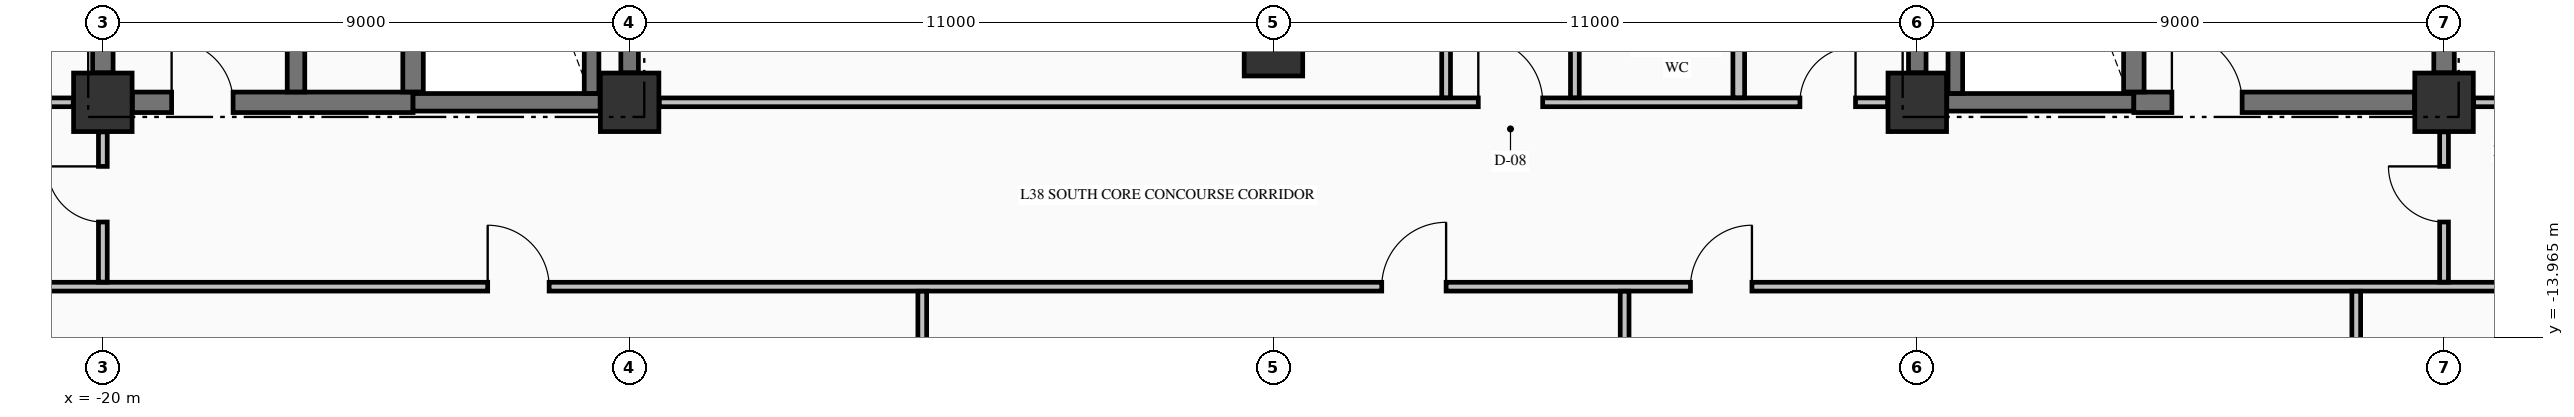
"""IFC4 building model, lengths in metres.
Left out: names, types, materials, properties, quantities, classifications, styles, units other than length and angle.
Written with IfcOpenShell. Run it as: python <this file> out.ifc"""

import sys

from ifc_helpers import new_model, si_unit, direction, frame, frame_2d, origin, origin_2d, place, context, subcontext, project, spatial, rectangle, extrude, element, fill, save


model = new_model("IFC4")
c1 = context("Model", 3, precision=1e-05, world=origin(), true_north=direction((0.0, 1.0)))
c2 = subcontext(c1, "Body", "Model", "MODEL_VIEW")
j1 = project(units=[si_unit("LENGTHUNIT", "METRE"), si_unit("PLANEANGLEUNIT", "RADIAN")], contexts=[c1])
p1 = place(None, origin())
s1 = spatial("IfcSite", under=j1, at=p1, CompositionType="ELEMENT")
p2 = place(p1, origin())
s2 = spatial("IfcBuilding", under=s1, at=p2, CompositionType="ELEMENT")
p3 = place(p2, frame((0.0, 0.0, 149.91)))
s3 = spatial("IfcBuildingStorey", under=s2, at=p3, CompositionType="ELEMENT", Elevation=149.91)
for number, where, z_axis, x_axis in (
    (1, (-20.0, -9.95, -0.25), (0.0, 0.0, 1.0), (1.0, 0.0, 0.0)),
    (2, (-11.0, -9.95, -0.25), (0.0, 0.0, 1.0), (1.0, 0.0, 0.0)),
    (3, (11.0, -9.95, -0.25), (0.0, 0.0, 1.0), (1.0, 0.0, 0.0)),
    (4, (20.0, -9.95, -0.25), (0.0, 0.0, 1.0), (1.0, 0.0, 0.0)),
    (5, (0.0, -9.0, -0.25), (0.0, 0.0, 1.0), (1.0, 0.0, 0.0)),
):
    element("IfcColumn", number, at=place(p3, frame(where, z_axis=z_axis, x_axis=x_axis)), inside=s3, PredefinedType="COLUMN", context=c2, shape_type="SweptSolid", body=[
        extrude(rectangle(XDim=1.0, YDim=1.0, at=origin_2d()), origin(), (0.0, 0.0, 1.0), 3.395),
    ])
p4 = place(p3, frame((-19.496, -9.95, 0.0), z_axis=(0.0, 0.0, 1.0), x_axis=(1.0, 0.0, 0.0)))
e6 = element("IfcWall", 6, at=p4, inside=s3, PredefinedType="SHEAR", context=c2, shape_type="SweptSolid", body=[
    extrude(rectangle(XDim=4.796, YDim=0.35, at=frame_2d((2.398, 0.0))), origin(), (0.0, 0.0, 1.0), 3.145),
])
p5 = place(p4, frame((0.671, 0.0, 0.0)))
e7 = element("IfcOpeningElement", 7, at=p5, cuts=e6, PredefinedType="OPENING", context=c2, shape_type="SweptSolid", body=[
    extrude(rectangle(XDim=1.05, YDim=2.15, at=frame_2d((0.525, 1.075))), frame((0.0, 0.185, 0.0), z_axis=(0.0, -1.0, 0.0), x_axis=(1.0, 0.0, 0.0)), (0.0, 0.0, 1.0), 0.37),
])
for number, where, z_axis, x_axis in (
    (8, (-14.7, -9.95, 0.0), (0.0, 0.0, 1.0), (1.0, 0.0, 0.0)),
    (9, (11.504, -9.95, 0.0), (0.0, 0.0, 1.0), (1.0, 0.0, 0.0)),
):
    element("IfcWall", number, at=place(p3, frame(where, z_axis=z_axis, x_axis=x_axis)), inside=s3, PredefinedType="SHEAR", context=c2, shape_type="SweptSolid", body=[
        extrude(rectangle(XDim=3.196, YDim=0.3, at=frame_2d((1.598, 0.0))), origin(), (0.0, 0.0, 1.0), 3.145),
    ])
p6 = place(p3, frame((14.7, -9.95, 0.0), z_axis=(0.0, 0.0, 1.0), x_axis=(1.0, 0.0, 0.0)))
e10 = element("IfcWall", 10, at=p6, inside=s3, PredefinedType="SHEAR", context=c2, shape_type="SweptSolid", body=[
    extrude(rectangle(XDim=4.796, YDim=0.35, at=frame_2d((2.398, 0.0))), origin(), (0.0, 0.0, 1.0), 3.145),
])
p7 = place(p6, frame((0.65, 0.0, 0.0)))
e11 = element("IfcOpeningElement", 11, at=p7, cuts=e10, PredefinedType="OPENING", context=c2, shape_type="SweptSolid", body=[
    extrude(rectangle(XDim=1.2, YDim=2.15, at=frame_2d((0.6, 1.075))), frame((0.0, 0.185, 0.0), z_axis=(0.0, -1.0, 0.0), x_axis=(1.0, 0.0, 0.0)), (0.0, 0.0, 1.0), 0.37),
])
p8 = place(p3, frame((-27.835, -13.1, 0.0), z_axis=(0.0, 0.0, 1.0), x_axis=(1.0, 0.0, 0.0)))
e12 = element("IfcWall", 12, at=p8, inside=s3, PredefinedType="PARTITIONING", context=c2, shape_type="SweptSolid", body=[
    extrude(rectangle(XDim=50.67, YDim=0.15, at=frame_2d((25.335, 0.0))), origin(), (0.0, 0.0, 1.0), 3.145),
])
p9 = place(p8, frame((29.685, 0.0, 0.0)))
e13 = element("IfcOpeningElement", 13, at=p9, cuts=e12, PredefinedType="OPENING", context=c2, shape_type="SweptSolid", body=[
    extrude(rectangle(XDim=1.1, YDim=2.15, at=frame_2d((0.55, 1.075))), frame((0.0, 0.085, 0.0), z_axis=(0.0, -1.0, 0.0), x_axis=(1.0, 0.0, 0.0)), (0.0, 0.0, 1.0), 0.17),
])
p10 = place(p8, frame((14.41, 0.0, 0.0)))
e14 = element("IfcOpeningElement", 14, at=p10, cuts=e12, PredefinedType="OPENING", context=c2, shape_type="SweptSolid", body=[
    extrude(rectangle(XDim=1.05, YDim=2.15, at=frame_2d((0.525, 1.075))), frame((0.0, 0.085, 0.0), z_axis=(0.0, -1.0, 0.0), x_axis=(1.0, 0.0, 0.0)), (0.0, 0.0, 1.0), 0.17),
])
p11 = place(p8, frame((34.96, 0.0, 0.0)))
e15 = element("IfcOpeningElement", 15, at=p11, cuts=e12, PredefinedType="OPENING", context=c2, shape_type="SweptSolid", body=[
    extrude(rectangle(XDim=1.05, YDim=2.15, at=frame_2d((0.525, 1.075))), frame((0.0, 0.085, 0.0), z_axis=(0.0, -1.0, 0.0), x_axis=(1.0, 0.0, 0.0)), (0.0, 0.0, 1.0), 0.17),
])
p12 = place(p3, frame((-27.835, -9.95, 0.0), z_axis=(0.0, 0.0, 1.0), x_axis=(1.0, 0.0, 0.0)))
e16 = element("IfcWall", 16, at=p12, inside=s3, PredefinedType="PARTITIONING", context=c2, shape_type="SweptSolid", body=[
    extrude(rectangle(XDim=7.329, YDim=0.15, at=frame_2d((3.665, 0.0))), origin(), (0.0, 0.0, 1.0), 3.145),
])
p13 = place(p12, frame((3.36, 0.0, 0.0)))
e17 = element("IfcOpeningElement", 17, at=p13, cuts=e16, PredefinedType="OPENING", context=c2, shape_type="SweptSolid", body=[
    extrude(rectangle(XDim=0.95, YDim=2.15, at=frame_2d((0.475, 1.075))), frame((0.0, 0.085, 0.0), z_axis=(0.0, -1.0, 0.0), x_axis=(1.0, 0.0, 0.0)), (0.0, 0.0, 1.0), 0.17),
])
p14 = place(p3, frame((-10.494, -9.95, 0.0), z_axis=(0.0, 0.0, 1.0), x_axis=(1.0, 0.0, 0.0)))
e18 = element("IfcWall", 18, at=p14, inside=s3, PredefinedType="PARTITIONING", context=c2, shape_type="SweptSolid", body=[
    extrude(rectangle(XDim=20.988, YDim=0.15, at=frame_2d((10.494, 0.0))), origin(), (0.0, 0.0, 1.0), 3.145),
])
p15 = place(p14, frame((13.994, 0.0, 0.0)))
e19 = element("IfcOpeningElement", 19, at=p15, cuts=e18, PredefinedType="OPENING", context=c2, shape_type="SweptSolid", body=[
    extrude(rectangle(XDim=1.1, YDim=2.15, at=frame_2d((0.55, 1.075))), frame((0.0, 0.085, 0.0), z_axis=(0.0, -1.0, 0.0), x_axis=(1.0, 0.0, 0.0)), (0.0, 0.0, 1.0), 0.17),
])
p16 = place(p14, frame((19.489, 0.0, 0.0)))
e20 = element("IfcOpeningElement", 20, at=p16, cuts=e18, PredefinedType="OPENING", context=c2, shape_type="SweptSolid", body=[
    extrude(rectangle(XDim=0.95, YDim=2.15, at=frame_2d((0.475, 1.075))), frame((0.0, 0.085, 0.0), z_axis=(0.0, -1.0, 0.0), x_axis=(1.0, 0.0, 0.0)), (0.0, 0.0, 1.0), 0.17),
])
p17 = place(p3, frame((20.506, -9.95, 0.0), z_axis=(0.0, 0.0, 1.0), x_axis=(1.0, 0.0, 0.0)))
e21 = element("IfcWall", 21, at=p17, inside=s3, PredefinedType="PARTITIONING", context=c2, shape_type="SweptSolid", body=[
    extrude(rectangle(XDim=2.329, YDim=0.15, at=frame_2d((1.165, 0.0))), origin(), (0.0, 0.0, 1.0), 3.145),
])
p18 = place(p17, frame((0.494, 0.0, 0.0)))
e22 = element("IfcOpeningElement", 22, at=p18, cuts=e21, PredefinedType="OPENING", context=c2, shape_type="SweptSolid", body=[
    extrude(rectangle(XDim=1.0, YDim=2.15, at=frame_2d((0.5, 1.075))), frame((0.0, 0.085, 0.0), z_axis=(0.0, -1.0, 0.0), x_axis=(1.0, 0.0, 0.0)), (0.0, 0.0, 1.0), 0.17),
])
p19 = place(p3, frame((-20.0, -9.446, 0.0), z_axis=(0.0, 0.0, 1.0), x_axis=(0.0, 1.0, 0.0)))
e23 = element("IfcWall", 23, at=p19, inside=s3, PredefinedType="SHEAR", context=c2, shape_type="SweptSolid", body=[
    extrude(rectangle(XDim=8.942, YDim=0.35, at=frame_2d((4.471, 0.0))), origin(), (0.0, 0.0, 1.0), 3.145),
])
p20 = place(p3, frame((-16.7, -9.773, 0.0), z_axis=(0.0, 0.0, 1.0), x_axis=(0.0, 1.0, 0.0)))
e24 = element("IfcWall", 24, at=p20, inside=s3, PredefinedType="SHEAR", context=c2, shape_type="SweptSolid", body=[
    extrude(rectangle(XDim=9.371, YDim=0.3, at=frame_2d((4.686, 0.0))), origin(), (0.0, 0.0, 1.0), 3.145),
])
p21 = place(p3, frame((-14.7, -9.773, 0.0), z_axis=(0.0, 0.0, 1.0), x_axis=(0.0, 1.0, 0.0)))
e25 = element("IfcWall", 25, at=p21, inside=s3, PredefinedType="SHEAR", context=c2, shape_type="SweptSolid", body=[
    extrude(rectangle(XDim=9.371, YDim=0.35, at=frame_2d((4.686, 0.0))), origin(), (0.0, 0.0, 1.0), 3.145),
])
p22 = place(p3, frame((-11.65, -9.798, 0.0), z_axis=(0.0, 0.0, 1.0), x_axis=(0.0, 1.0, 0.0)))
e26 = element("IfcWall", 26, at=p22, inside=s3, PredefinedType="SOLIDWALL", context=c2, shape_type="SweptSolid", body=[
    extrude(rectangle(XDim=9.396, YDim=0.25, at=frame_2d((4.698, 0.0))), origin(), (0.0, 0.0, 1.0), 3.145),
])
for number, where, z_axis, x_axis in (
    (27, (-11.0, -9.446, 0.0), (0.0, 0.0, 1.0), (0.0, 1.0, 0.0)),
    (28, (11.0, -9.446, 0.0), (0.0, 0.0, 1.0), (0.0, 1.0, 0.0)),
):
    element("IfcWall", number, at=place(p3, frame(where, z_axis=z_axis, x_axis=x_axis)), inside=s3, PredefinedType="SHEAR", context=c2, shape_type="SweptSolid", body=[
        extrude(rectangle(XDim=8.942, YDim=0.3, at=frame_2d((4.471, 0.0))), origin(), (0.0, 0.0, 1.0), 3.145),
    ])
p23 = place(p3, frame((11.65, -9.798, 0.0), z_axis=(0.0, 0.0, 1.0), x_axis=(0.0, 1.0, 0.0)))
e29 = element("IfcWall", 29, at=p23, inside=s3, PredefinedType="SOLIDWALL", context=c2, shape_type="SweptSolid", body=[
    extrude(rectangle(XDim=9.396, YDim=0.25, at=frame_2d((4.698, 0.0))), origin(), (0.0, 0.0, 1.0), 3.145),
])
p24 = place(p3, frame((14.7, -9.773, 0.0), z_axis=(0.0, 0.0, 1.0), x_axis=(0.0, 1.0, 0.0)))
e30 = element("IfcWall", 30, at=p24, inside=s3, PredefinedType="SHEAR", context=c2, shape_type="SweptSolid", body=[
    extrude(rectangle(XDim=9.371, YDim=0.35, at=frame_2d((4.686, 0.0))), origin(), (0.0, 0.0, 1.0), 3.145),
])
p25 = place(p3, frame((20.0, -9.446, 0.0), z_axis=(0.0, 0.0, 1.0), x_axis=(0.0, 1.0, 0.0)))
e31 = element("IfcWall", 31, at=p25, inside=s3, PredefinedType="SHEAR", context=c2, shape_type="SweptSolid", body=[
    extrude(rectangle(XDim=2.269, YDim=0.35, at=frame_2d((1.135, 0.0))), origin(), (0.0, 0.0, 1.0), 3.145),
])
p26 = place(p3, frame((-20.0, -13.022, 0.0), z_axis=(0.0, 0.0, 1.0), x_axis=(0.0, 1.0, 0.0)))
e32 = element("IfcWall", 32, at=p26, inside=s3, PredefinedType="PARTITIONING", context=c2, shape_type="SweptSolid", body=[
    extrude(rectangle(XDim=2.566, YDim=0.15, at=frame_2d((1.283, 0.0))), origin(), (0.0, 0.0, 1.0), 2.635),
])
p27 = place(p26, frame((1.027, 0.0, 0.0)))
e33 = element("IfcOpeningElement", 33, at=p27, cuts=e32, PredefinedType="OPENING", context=c2, shape_type="SweptSolid", body=[
    extrude(rectangle(XDim=0.95, YDim=2.15, at=frame_2d((0.475, 1.075))), frame((0.0, 0.085, 0.0), z_axis=(0.0, -1.0, 0.0), x_axis=(1.0, 0.0, 0.0)), (0.0, 0.0, 1.0), 0.17),
])
p28 = place(p3, frame((-6.0, -17.472, 0.0), z_axis=(0.0, 0.0, 1.0), x_axis=(0.0, 1.0, 0.0)))
e34 = element("IfcWall", 34, at=p28, inside=s3, PredefinedType="PARTITIONING", context=c2, shape_type="SweptSolid", body=[
    extrude(rectangle(XDim=4.294, YDim=0.15, at=frame_2d((2.147, 0.0))), origin(), (0.0, 0.0, 1.0), 3.145),
])
p29 = place(p3, frame((2.95, -9.872, 0.0), z_axis=(0.0, 0.0, 1.0), x_axis=(0.0, 1.0, 0.0)))
e35 = element("IfcWall", 35, at=p29, inside=s3, PredefinedType="PARTITIONING", context=c2, shape_type="SweptSolid", body=[
    extrude(rectangle(XDim=9.544, YDim=0.15, at=frame_2d((4.772, 0.0))), origin(), (0.0, 0.0, 1.0), 3.145),
])
p30 = place(p3, frame((5.15, -9.872, 0.0), z_axis=(0.0, 0.0, 1.0), x_axis=(0.0, 1.0, 0.0)))
e36 = element("IfcWall", 36, at=p30, inside=s3, PredefinedType="PARTITIONING", context=c2, shape_type="SweptSolid", body=[
    extrude(rectangle(XDim=4.919, YDim=0.15, at=frame_2d((2.459, 0.0))), origin(), (0.0, 0.0, 1.0), 3.145),
])
p31 = place(p30, frame((1.997, 0.0, 0.0)))
e37 = element("IfcOpeningElement", 37, at=p31, cuts=e36, PredefinedType="OPENING", context=c2, shape_type="SweptSolid", body=[
    extrude(rectangle(XDim=0.95, YDim=2.15, at=frame_2d((0.475, 1.075))), frame((0.0, 0.085, 0.0), z_axis=(0.0, -1.0, 0.0), x_axis=(1.0, 0.0, 0.0)), (0.0, 0.0, 1.0), 0.17),
])
p32 = place(p3, frame((6.0, -17.472, 0.0), z_axis=(0.0, 0.0, 1.0), x_axis=(0.0, 1.0, 0.0)))
e38 = element("IfcWall", 38, at=p32, inside=s3, PredefinedType="PARTITIONING", context=c2, shape_type="SweptSolid", body=[
    extrude(rectangle(XDim=4.294, YDim=0.15, at=frame_2d((2.147, 0.0))), origin(), (0.0, 0.0, 1.0), 3.145),
])
p33 = place(p3, frame((7.95, -9.872, 0.0), z_axis=(0.0, 0.0, 1.0), x_axis=(0.0, 1.0, 0.0)))
e39 = element("IfcWall", 39, at=p33, inside=s3, PredefinedType="PARTITIONING", context=c2, shape_type="SweptSolid", body=[
    extrude(rectangle(XDim=4.919, YDim=0.2, at=frame_2d((2.459, 0.0))), origin(), (0.0, 0.0, 1.0), 3.145),
])
p34 = place(p3, frame((18.5, -20.394, 0.0), z_axis=(0.0, 0.0, 1.0), x_axis=(0.0, 1.0, 0.0)))
e40 = element("IfcWall", 40, at=p34, inside=s3, PredefinedType="PARTITIONING", context=c2, shape_type="SweptSolid", body=[
    extrude(rectangle(XDim=7.216, YDim=0.15, at=frame_2d((3.608, 0.0))), origin(), (0.0, 0.0, 1.0), 3.145),
])
p35 = place(p3, frame((20.0, -13.022, 0.0), z_axis=(0.0, 0.0, 1.0), x_axis=(0.0, 1.0, 0.0)))
e41 = element("IfcWall", 41, at=p35, inside=s3, PredefinedType="PARTITIONING", context=c2, shape_type="SweptSolid", body=[
    extrude(rectangle(XDim=2.566, YDim=0.15, at=frame_2d((1.283, 0.0))), origin(), (0.0, 0.0, 1.0), 2.635),
])
p36 = place(p35, frame((1.027, 0.0, 0.0)))
e42 = element("IfcOpeningElement", 42, at=p36, cuts=e41, PredefinedType="OPENING", context=c2, shape_type="SweptSolid", body=[
    extrude(rectangle(XDim=0.95, YDim=2.15, at=frame_2d((0.475, 1.075))), frame((0.0, 0.085, 0.0), z_axis=(0.0, -1.0, 0.0), x_axis=(1.0, 0.0, 0.0)), (0.0, 0.0, 1.0), 0.17),
])
p37 = place(p5, origin())
e43 = element("IfcDoor", 43, at=p37, inside=s3, OperationType="SINGLE_SWING_LEFT", PredefinedType="DOOR", context=c2, shape_type="SweptSolid", body=[
    extrude(rectangle(XDim=1.05, YDim=2.15, at=frame_2d((0.525, 1.075))), frame((0.0, 0.025, 0.0), z_axis=(0.0, -1.0, 0.0), x_axis=(1.0, 0.0, 0.0)), (0.0, 0.0, 1.0), 0.05),
])
fill(e7, e43)
p38 = place(p7, origin())
e44 = element("IfcDoor", 44, at=p38, inside=s3, OperationType="SINGLE_SWING_LEFT", PredefinedType="DOOR", context=c2, shape_type="SweptSolid", body=[
    extrude(rectangle(XDim=1.2, YDim=2.15, at=frame_2d((0.6, 1.075))), frame((0.0, 0.025, 0.0), z_axis=(0.0, -1.0, 0.0), x_axis=(1.0, 0.0, 0.0)), (0.0, 0.0, 1.0), 0.05),
])
fill(e11, e44)
p39 = place(p15, origin())
e45 = element("IfcDoor", 45, at=p39, inside=s3, OperationType="SINGLE_SWING_LEFT", PredefinedType="DOOR", context=c2, shape_type="SweptSolid", body=[
    extrude(rectangle(XDim=1.1, YDim=2.15, at=frame_2d((0.55, 1.075))), frame((0.0, 0.025, 0.0), z_axis=(0.0, -1.0, 0.0), x_axis=(1.0, 0.0, 0.0)), (0.0, 0.0, 1.0), 0.05),
])
fill(e19, e45)
p40 = place(p9, origin())
e46 = element("IfcDoor", 46, at=p40, inside=s3, OperationType="SINGLE_SWING_RIGHT", PredefinedType="DOOR", context=c2, shape_type="SweptSolid", body=[
    extrude(rectangle(XDim=1.1, YDim=2.15, at=frame_2d((0.55, 1.075))), frame((0.0, 0.025, 0.0), z_axis=(0.0, -1.0, 0.0), x_axis=(1.0, 0.0, 0.0)), (0.0, 0.0, 1.0), 0.05),
])
fill(e13, e46)
p41 = place(p10, origin())
e47 = element("IfcDoor", 47, at=p41, inside=s3, OperationType="SINGLE_SWING_LEFT", PredefinedType="DOOR", context=c2, shape_type="SweptSolid", body=[
    extrude(rectangle(XDim=1.05, YDim=2.15, at=frame_2d((0.525, 1.075))), frame((0.0, 0.025, 0.0), z_axis=(0.0, -1.0, 0.0), x_axis=(1.0, 0.0, 0.0)), (0.0, 0.0, 1.0), 0.05),
])
fill(e14, e47)
p42 = place(p11, origin())
e48 = element("IfcDoor", 48, at=p42, inside=s3, OperationType="SINGLE_SWING_RIGHT", PredefinedType="DOOR", context=c2, shape_type="SweptSolid", body=[
    extrude(rectangle(XDim=1.05, YDim=2.15, at=frame_2d((0.525, 1.075))), frame((0.0, 0.025, 0.0), z_axis=(0.0, -1.0, 0.0), x_axis=(1.0, 0.0, 0.0)), (0.0, 0.0, 1.0), 0.05),
])
fill(e15, e48)
p43 = place(p16, origin())
e49 = element("IfcDoor", 49, at=p43, inside=s3, OperationType="SINGLE_SWING_RIGHT", PredefinedType="DOOR", context=c2, shape_type="SweptSolid", body=[
    extrude(rectangle(XDim=0.95, YDim=2.15, at=frame_2d((0.475, 1.075))), frame((0.0, 0.025, 0.0), z_axis=(0.0, -1.0, 0.0), x_axis=(1.0, 0.0, 0.0)), (0.0, 0.0, 1.0), 0.05),
])
fill(e20, e49)
p44 = place(p27, origin())
e50 = element("IfcDoor", 50, at=p44, inside=s3, OperationType="SINGLE_SWING_RIGHT", PredefinedType="DOOR", context=c2, shape_type="SweptSolid", body=[
    extrude(rectangle(XDim=0.95, YDim=2.15, at=frame_2d((0.475, 1.075))), frame((0.0, 0.025, 0.0), z_axis=(0.0, -1.0, 0.0), x_axis=(1.0, 0.0, 0.0)), (0.0, 0.0, 1.0), 0.05),
])
fill(e33, e50)
p45 = place(p36, origin())
e51 = element("IfcDoor", 51, at=p45, inside=s3, OperationType="SINGLE_SWING_RIGHT", PredefinedType="DOOR", context=c2, shape_type="SweptSolid", body=[
    extrude(rectangle(XDim=0.95, YDim=2.15, at=frame_2d((0.475, 1.075))), frame((0.0, 0.025, 0.0), z_axis=(0.0, -1.0, 0.0), x_axis=(1.0, 0.0, 0.0)), (0.0, 0.0, 1.0), 0.05),
])
fill(e42, e51)
save(model, sys.argv[1])
